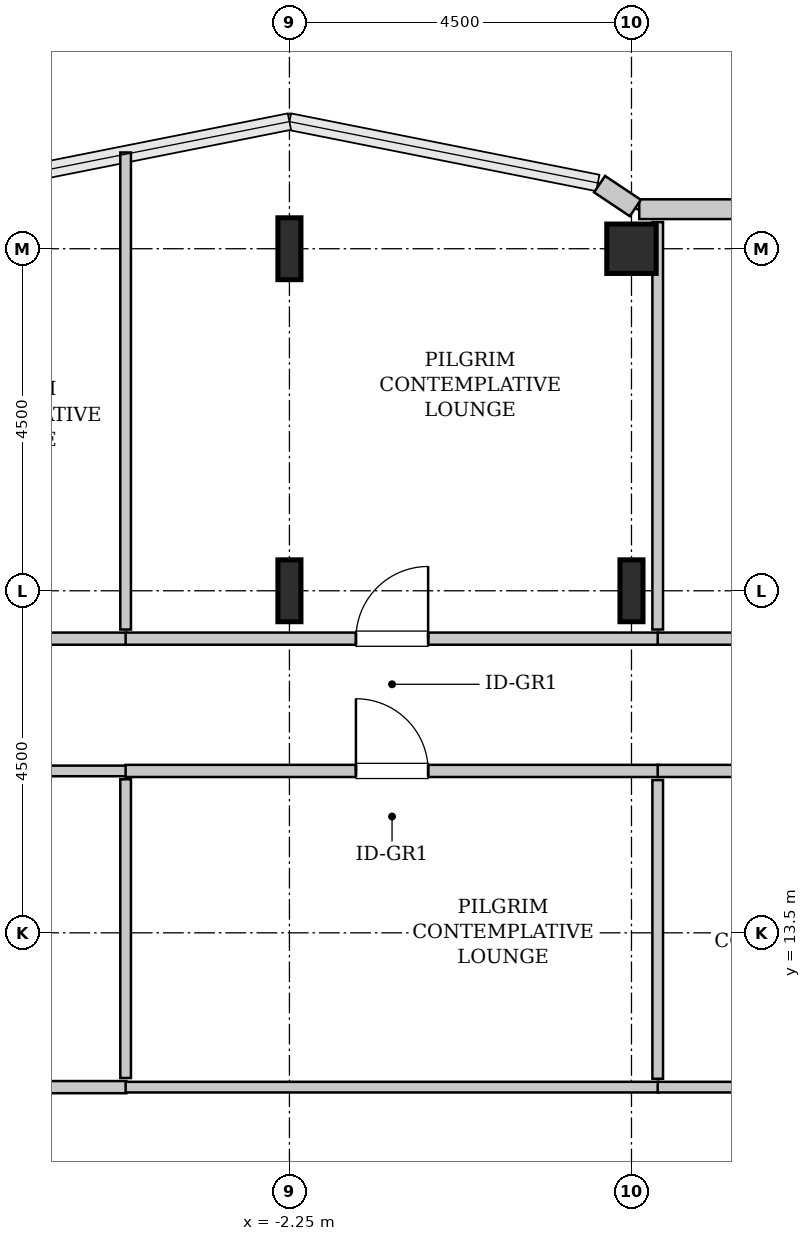
"""IFC4 building model, lengths in metres.
Left out: names, types, materials, properties, quantities, classifications, styles, units other than length and angle.
Written with IfcOpenShell. Run it as: python <this file> out.ifc"""

import sys

from ifc_helpers import new_model, si_unit, direction, frame, frame_2d, origin, origin_2d, place, context, subcontext, project, spatial, rectangle, hollow_rectangle, i_section, extrude, source, transform, mapped, element, fill, save


model = new_model("IFC4")
c1 = context("Model", 3, precision=1e-05, world=origin(), true_north=direction((0.0, 1.0)))
c2 = subcontext(c1, "Body", "Model", "MODEL_VIEW")
j1 = project(units=[si_unit("LENGTHUNIT", "METRE"), si_unit("PLANEANGLEUNIT", "RADIAN")], contexts=[c1])
p1 = place(None, origin())
s1 = spatial("IfcSite", under=j1, at=p1, CompositionType="ELEMENT")
p2 = place(p1, origin())
s2 = spatial("IfcBuilding", under=s1, at=p2, CompositionType="ELEMENT")
p3 = place(p2, frame((0.0, 0.0, 252.2)))
s3 = spatial("IfcBuildingStorey", under=s2, at=p3, CompositionType="ELEMENT", Elevation=252.2)
m1 = source(origin(), c2, "Body", "SweptSolid", [
    extrude(i_section(OverallWidth=0.303, OverallDepth=0.814, WebThickness=0.021, FlangeThickness=0.04, FilletRadius=0.03, at=origin_2d()), origin(), (0.0, 0.0, 1.0), 3.8),
])
for number, where, z_axis, x_axis in (
    (1, (-2.25, 18.0, 0.0), (0.0, 0.0, 1.0), (1.0, 0.0, 0.0)),
    (2, (-2.25, 22.5, 0.0), (0.0, 0.0, 1.0), (1.0, 0.0, 0.0)),
    (3, (2.25, 18.0, 0.0), (0.0, 0.0, 1.0), (1.0, 0.0, 0.0)),
):
    element("IfcColumn", number, at=place(p3, frame(where, z_axis=z_axis, x_axis=x_axis)), inside=s3, PredefinedType="COLUMN", context=c2, shape_type="MappedRepresentation", body=[
        mapped(m1, transform((0.0, 0.0, 0.0), x_axis=(1.0, 0.0, 0.0), y_axis=(0.0, 1.0, 0.0), z_axis=(0.0, 0.0, 1.0), scale=1.0)),
    ])
m2 = source(origin(), c2, "Body", "SweptSolid", [
    extrude(hollow_rectangle(XDim=0.65, YDim=0.65, WallThickness=0.032, InnerFilletRadius=0.032, OuterFilletRadius=0.064, at=origin_2d()), origin(), (0.0, 0.0, 1.0), 3.8),
])
p4 = place(p3, frame((2.25, 22.5, 0.0), z_axis=(0.0, 0.0, 1.0), x_axis=(1.0, 0.0, 0.0)))
e4 = element("IfcColumn", 4, at=p4, inside=s3, PredefinedType="COLUMN", context=c2, shape_type="MappedRepresentation", body=[
    mapped(m2, transform((0.0, 0.0, 0.0), x_axis=(1.0, 0.0, 0.0), y_axis=(0.0, 1.0, 0.0), z_axis=(0.0, 0.0, 1.0), scale=1.0)),
])
m3 = source(origin(), c2, "Body", "SweptSolid", [
    extrude(rectangle(XDim=1.37, YDim=0.26, at=frame_2d((0.685, 0.0))), origin(), (0.0, 0.0, 1.0), 3.55),
])
p5 = place(p3, frame((3.722, 23.02, 0.0), z_axis=(0.0, 0.0, 1.0), x_axis=(-1.0, 0.0, 0.0)))
e5 = element("IfcWall", 5, at=p5, inside=s3, PredefinedType="SOLIDWALL", context=c2, shape_type="MappedRepresentation", body=[
    mapped(m3, transform((0.0, 0.0, 0.0), x_axis=(1.0, 0.0, 0.0), y_axis=(0.0, 1.0, 0.0), z_axis=(0.0, 0.0, 1.0), scale=1.0)),
])
m4 = source(origin(), c2, "Body", "SweptSolid", [
    extrude(rectangle(XDim=0.565, YDim=0.26, at=frame_2d((0.283, 0.0))), origin(), (0.0, 0.0, 1.0), 3.55),
])
p6 = place(p3, frame((2.301, 23.036, 0.0), z_axis=(0.0, 0.0, 1.0), x_axis=(-0.831651492666, 0.555297933317, 0.0)))
e6 = element("IfcWall", 6, at=p6, inside=s3, PredefinedType="SOLIDWALL", context=c2, shape_type="MappedRepresentation", body=[
    mapped(m4, transform((0.0, 0.0, 0.0), x_axis=(1.0, 0.0, 0.0), y_axis=(0.0, 1.0, 0.0), z_axis=(0.0, 0.0, 1.0), scale=1.0)),
])
m5 = source(origin(), c2, "Body", "SweptSolid", [
    extrude(rectangle(XDim=7.615, YDim=0.16, at=frame_2d((3.808, 0.0))), origin(), (0.0, 0.0, 1.0), 3.535),
])
p7 = place(p3, frame((-12.01, 11.47, 0.0), z_axis=(0.0, 0.0, 1.0), x_axis=(1.0, 0.0, 0.0)))
e7 = element("IfcWall", 7, at=p7, inside=s3, PredefinedType="PARTITIONING", context=c2, shape_type="MappedRepresentation", body=[
    mapped(m5, transform((0.0, 0.0, 0.0), x_axis=(1.0, 0.0, 0.0), y_axis=(0.0, 1.0, 0.0), z_axis=(0.0, 0.0, 1.0), scale=1.0)),
])
p8 = place(p7, frame((3.333, 0.0, 0.0)))
e8 = element("IfcOpeningElement", 8, at=p8, cuts=e7, PredefinedType="OPENING", context=c2, shape_type="SweptSolid", body=[
    extrude(rectangle(XDim=0.95, YDim=2.1, at=frame_2d((0.475, 1.05))), frame((0.0, 0.09, 0.0), z_axis=(0.0, -1.0, 0.0), x_axis=(1.0, 0.0, 0.0)), (0.0, 0.0, 1.0), 0.18),
])
m6 = source(origin(), c2, "Body", "SweptSolid", [
    extrude(rectangle(XDim=7.615, YDim=0.14, at=frame_2d((3.808, 0.0))), origin(), (0.0, 0.0, 1.0), 3.535),
])
p9 = place(p3, frame((-12.01, 15.63, 0.0), z_axis=(0.0, 0.0, 1.0), x_axis=(1.0, 0.0, 0.0)))
e9 = element("IfcWall", 9, at=p9, inside=s3, PredefinedType="PARTITIONING", context=c2, shape_type="MappedRepresentation", body=[
    mapped(m6, transform((0.0, 0.0, 0.0), x_axis=(1.0, 0.0, 0.0), y_axis=(0.0, 1.0, 0.0), z_axis=(0.0, 0.0, 1.0), scale=1.0)),
])
m7 = source(origin(), c2, "Body", "SweptSolid", [
    extrude(rectangle(XDim=3.93, YDim=0.14, at=frame_2d((1.965, 0.0))), origin(), (0.0, 0.0, 1.0), 3.535),
])
p10 = place(p3, frame((-4.405, 11.59, 0.0), z_axis=(0.0, 0.0, 1.0), x_axis=(0.0, 1.0, 0.0)))
e10 = element("IfcWall", 10, at=p10, inside=s3, PredefinedType="PARTITIONING", context=c2, shape_type="MappedRepresentation", body=[
    mapped(m7, transform((0.0, 0.0, 0.0), x_axis=(1.0, 0.0, 0.0), y_axis=(0.0, 1.0, 0.0), z_axis=(0.0, 0.0, 1.0), scale=1.0)),
])
m8 = source(origin(), c2, "Body", "SweptSolid", [
    extrude(rectangle(XDim=3.045, YDim=0.16, at=frame_2d((1.522, 0.0))), origin(), (0.0, 0.0, 1.0), 3.535),
])
p11 = place(p3, frame((-7.44, 17.37, 0.0), z_axis=(0.0, 0.0, 1.0), x_axis=(1.0, 0.0, 0.0)))
e11 = element("IfcWall", 11, at=p11, inside=s3, PredefinedType="PARTITIONING", context=c2, shape_type="MappedRepresentation", body=[
    mapped(m8, transform((0.0, 0.0, 0.0), x_axis=(1.0, 0.0, 0.0), y_axis=(0.0, 1.0, 0.0), z_axis=(0.0, 0.0, 1.0), scale=1.0)),
])
p12 = place(p11, frame((1.048, 0.0, 0.0)))
e12 = element("IfcOpeningElement", 12, at=p12, cuts=e11, PredefinedType="OPENING", context=c2, shape_type="SweptSolid", body=[
    extrude(rectangle(XDim=0.95, YDim=2.1, at=frame_2d((0.475, 1.05))), frame((0.0, 0.09, 0.0), z_axis=(0.0, -1.0, 0.0), x_axis=(1.0, 0.0, 0.0)), (0.0, 0.0, 1.0), 0.18),
])
m9 = source(origin(), c2, "Body", "SweptSolid", [
    extrude(rectangle(XDim=6.276, YDim=0.14, at=frame_2d((3.138, 0.0))), origin(), (0.0, 0.0, 1.0), 3.535),
])
p13 = place(p3, frame((-4.405, 17.49, 0.0), z_axis=(0.0, 0.0, 1.0), x_axis=(0.0, 1.0, 0.0)))
e13 = element("IfcWall", 13, at=p13, inside=s3, PredefinedType="PARTITIONING", context=c2, shape_type="MappedRepresentation", body=[
    mapped(m9, transform((0.0, 0.0, 0.0), x_axis=(1.0, 0.0, 0.0), y_axis=(0.0, 1.0, 0.0), z_axis=(0.0, 0.0, 1.0), scale=1.0)),
])
m10 = source(origin(), c2, "Body", "SweptSolid", [
    extrude(rectangle(XDim=7.01, YDim=0.16, at=frame_2d((3.505, 0.0))), origin(), (0.0, 0.0, 1.0), 3.535),
])
p14 = place(p3, frame((-4.405, 17.37, 0.0), z_axis=(0.0, 0.0, 1.0), x_axis=(1.0, 0.0, 0.0)))
e14 = element("IfcWall", 14, at=p14, inside=s3, PredefinedType="PARTITIONING", context=c2, shape_type="MappedRepresentation", body=[
    mapped(m10, transform((0.0, 0.0, 0.0), x_axis=(1.0, 0.0, 0.0), y_axis=(0.0, 1.0, 0.0), z_axis=(0.0, 0.0, 1.0), scale=1.0)),
])
p15 = place(p14, frame((3.03, 0.0, 0.0)))
e15 = element("IfcOpeningElement", 15, at=p15, cuts=e14, PredefinedType="OPENING", context=c2, shape_type="SweptSolid", body=[
    extrude(rectangle(XDim=0.95, YDim=2.1, at=frame_2d((0.475, 1.05))), frame((0.0, 0.09, 0.0), z_axis=(0.0, -1.0, 0.0), x_axis=(1.0, 0.0, 0.0)), (0.0, 0.0, 1.0), 0.18),
])
m11 = source(origin(), c2, "Body", "SweptSolid", [
    extrude(rectangle(XDim=5.36, YDim=0.14, at=frame_2d((2.68, 0.0))), origin(), (0.0, 0.0, 1.0), 2.925),
])
p16 = place(p3, frame((2.595, 17.49, 0.0), z_axis=(0.0, 0.0, 1.0), x_axis=(0.0, 1.0, 0.0)))
e16 = element("IfcWall", 16, at=p16, inside=s3, PredefinedType="PARTITIONING", context=c2, shape_type="MappedRepresentation", body=[
    mapped(m11, transform((0.0, 0.0, 0.0), x_axis=(1.0, 0.0, 0.0), y_axis=(0.0, 1.0, 0.0), z_axis=(0.0, 0.0, 1.0), scale=1.0)),
])
p17 = place(p3, frame((-4.405, 15.63, 0.0), z_axis=(0.0, 0.0, 1.0), x_axis=(1.0, 0.0, 0.0)))
e17 = element("IfcWall", 17, at=p17, inside=s3, PredefinedType="PARTITIONING", context=c2, shape_type="MappedRepresentation", body=[
    mapped(m10, transform((0.0, 0.0, 0.0), x_axis=(1.0, 0.0, 0.0), y_axis=(0.0, 1.0, 0.0), z_axis=(0.0, 0.0, 1.0), scale=1.0)),
])
p18 = place(p17, frame((3.03, 0.0, 0.0)))
e18 = element("IfcOpeningElement", 18, at=p18, cuts=e17, PredefinedType="OPENING", context=c2, shape_type="SweptSolid", body=[
    extrude(rectangle(XDim=0.95, YDim=2.1, at=frame_2d((0.475, 1.05))), frame((0.0, 0.09, 0.0), z_axis=(0.0, -1.0, 0.0), x_axis=(1.0, 0.0, 0.0)), (0.0, 0.0, 1.0), 0.18),
])
m12 = source(origin(), c2, "Body", "SweptSolid", [
    extrude(rectangle(XDim=7.01, YDim=0.14, at=frame_2d((3.505, 0.0))), origin(), (0.0, 0.0, 1.0), 3.535),
])
p19 = place(p3, frame((-4.405, 11.47, 0.0), z_axis=(0.0, 0.0, 1.0), x_axis=(1.0, 0.0, 0.0)))
e19 = element("IfcWall", 19, at=p19, inside=s3, PredefinedType="PARTITIONING", context=c2, shape_type="MappedRepresentation", body=[
    mapped(m12, transform((0.0, 0.0, 0.0), x_axis=(1.0, 0.0, 0.0), y_axis=(0.0, 1.0, 0.0), z_axis=(0.0, 0.0, 1.0), scale=1.0)),
])
p20 = place(p3, frame((2.595, 11.58, 0.0), z_axis=(0.0, 0.0, 1.0), x_axis=(0.0, 1.0, 0.0)))
e20 = element("IfcWall", 20, at=p20, inside=s3, PredefinedType="PARTITIONING", context=c2, shape_type="MappedRepresentation", body=[
    mapped(m7, transform((0.0, 0.0, 0.0), x_axis=(1.0, 0.0, 0.0), y_axis=(0.0, 1.0, 0.0), z_axis=(0.0, 0.0, 1.0), scale=1.0)),
])
m13 = source(origin(), c2, "Body", "SweptSolid", [
    extrude(rectangle(XDim=5.61, YDim=0.16, at=frame_2d((2.805, 0.0))), origin(), (0.0, 0.0, 1.0), 3.535),
])
p21 = place(p3, frame((2.595, 17.37, 0.0), z_axis=(0.0, 0.0, 1.0), x_axis=(1.0, 0.0, 0.0)))
e21 = element("IfcWall", 21, at=p21, inside=s3, PredefinedType="PARTITIONING", context=c2, shape_type="MappedRepresentation", body=[
    mapped(m13, transform((0.0, 0.0, 0.0), x_axis=(1.0, 0.0, 0.0), y_axis=(0.0, 1.0, 0.0), z_axis=(0.0, 0.0, 1.0), scale=1.0)),
])
p22 = place(p21, frame((2.33, 0.0, 0.0)))
e22 = element("IfcOpeningElement", 22, at=p22, cuts=e21, PredefinedType="OPENING", context=c2, shape_type="SweptSolid", body=[
    extrude(rectangle(XDim=0.95, YDim=2.1, at=frame_2d((0.475, 1.05))), frame((0.0, 0.09, 0.0), z_axis=(0.0, -1.0, 0.0), x_axis=(1.0, 0.0, 0.0)), (0.0, 0.0, 1.0), 0.18),
])
p23 = place(p3, frame((2.595, 15.63, 0.0), z_axis=(0.0, 0.0, 1.0), x_axis=(1.0, 0.0, 0.0)))
e23 = element("IfcWall", 23, at=p23, inside=s3, PredefinedType="PARTITIONING", context=c2, shape_type="MappedRepresentation", body=[
    mapped(m13, transform((0.0, 0.0, 0.0), x_axis=(1.0, 0.0, 0.0), y_axis=(0.0, 1.0, 0.0), z_axis=(0.0, 0.0, 1.0), scale=1.0)),
])
p24 = place(p23, frame((2.33, 0.0, 0.0)))
e24 = element("IfcOpeningElement", 24, at=p24, cuts=e23, PredefinedType="OPENING", context=c2, shape_type="SweptSolid", body=[
    extrude(rectangle(XDim=0.95, YDim=2.1, at=frame_2d((0.475, 1.05))), frame((0.0, 0.09, 0.0), z_axis=(0.0, -1.0, 0.0), x_axis=(1.0, 0.0, 0.0)), (0.0, 0.0, 1.0), 0.18),
])
m14 = source(origin(), c2, "Body", "SweptSolid", [
    extrude(rectangle(XDim=5.61, YDim=0.14, at=frame_2d((2.805, 0.0))), origin(), (0.0, 0.0, 1.0), 3.535),
])
p25 = place(p3, frame((2.595, 11.47, 0.0), z_axis=(0.0, 0.0, 1.0), x_axis=(1.0, 0.0, 0.0)))
e25 = element("IfcWall", 25, at=p25, inside=s3, PredefinedType="PARTITIONING", context=c2, shape_type="MappedRepresentation", body=[
    mapped(m14, transform((0.0, 0.0, 0.0), x_axis=(1.0, 0.0, 0.0), y_axis=(0.0, 1.0, 0.0), z_axis=(0.0, 0.0, 1.0), scale=1.0)),
])
m15 = source(origin(), c2, "Body", "SweptSolid", [
    extrude(rectangle(XDim=0.95, YDim=2.1, at=frame_2d((0.475, 1.05))), frame((0.0, 0.025, 0.0), z_axis=(0.0, -1.0, 0.0), x_axis=(1.0, 0.0, 0.0)), (0.0, 0.0, 1.0), 0.05),
])
p26 = place(p15, origin())
e26 = element("IfcDoor", 26, at=p26, inside=s3, OperationType="SINGLE_SWING_RIGHT", PredefinedType="DOOR", context=c2, shape_type="MappedRepresentation", body=[
    mapped(m15, transform((0.0, 0.0, 0.0), x_axis=(1.0, 0.0, 0.0), y_axis=(0.0, 1.0, 0.0), z_axis=(0.0, 0.0, 1.0), scale=1.0)),
])
fill(e15, e26)
p27 = place(p18, origin())
e27 = element("IfcDoor", 27, at=p27, inside=s3, OperationType="SINGLE_SWING_LEFT", PredefinedType="DOOR", context=c2, shape_type="MappedRepresentation", body=[
    mapped(m15, transform((0.0, 0.0, 0.0), x_axis=(1.0, 0.0, 0.0), y_axis=(0.0, 1.0, 0.0), z_axis=(0.0, 0.0, 1.0), scale=1.0)),
])
fill(e18, e27)
save(model, sys.argv[1])
